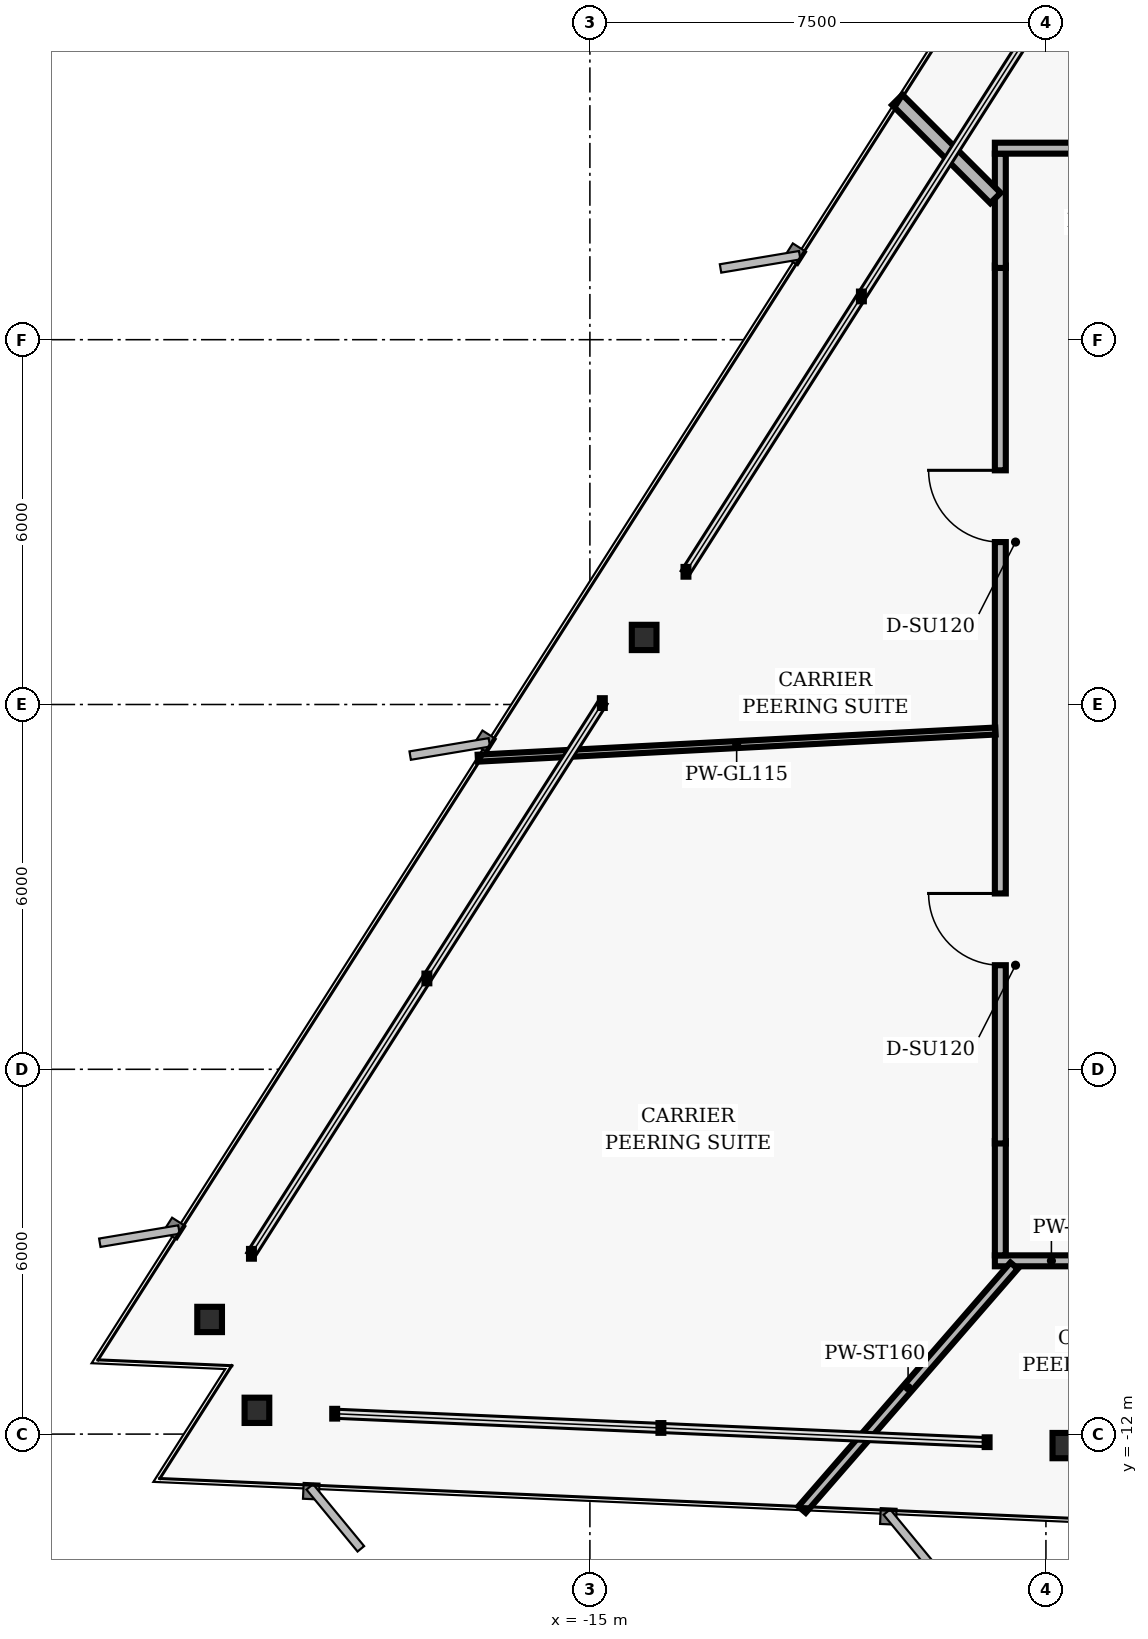
"""IFC4 building model, lengths in metres.
Left out: names, types, materials, properties, quantities, classifications, styles, units other than length and angle.
Written with IfcOpenShell. Run it as: python <this file> out.ifc"""

import sys

from ifc_helpers import new_model, si_unit, direction, frame, frame_2d, origin, origin_2d, place, context, subcontext, project, spatial, rectangle, i_section, extrude, element, fill, save


model = new_model("IFC4")
c1 = context("Model", 3, precision=1e-05, world=origin(), true_north=direction((0.0, 1.0)))
c2 = subcontext(c1, "Body", "Model", "MODEL_VIEW")
j1 = project(units=[si_unit("LENGTHUNIT", "METRE"), si_unit("PLANEANGLEUNIT", "RADIAN")], contexts=[c1])
p1 = place(None, origin())
s1 = spatial("IfcSite", under=j1, at=p1, CompositionType="ELEMENT")
p2 = place(p1, origin())
s2 = spatial("IfcBuilding", under=s1, at=p2, CompositionType="ELEMENT")
p3 = place(p2, frame((0.0, 0.0, 128.96)))
s3 = spatial("IfcBuildingStorey", under=s2, at=p3, CompositionType="ELEMENT", Elevation=128.96)
for number, where, z_axis, x_axis in (
    (1, (-14.108, 1.103, 0.0), (0.0, 0.0, 1.0), (1.0, 0.0, 0.0)),
    (2, (-21.254, -10.114, 0.0), (0.0, 0.0, 1.0), (1.0, 0.0, 0.0)),
    (3, (-20.476, -11.609, 0.0), (0.0, 0.0, 1.0), (1.0, 0.0, 0.0)),
    (4, (-7.188, -12.189, 0.0), (0.0, 0.0, 1.0), (1.0, 0.0, 0.0)),
):
    element("IfcColumn", number, at=place(p3, frame(where, z_axis=z_axis, x_axis=x_axis)), inside=s3, PredefinedType="COLUMN", context=c2, shape_type="SweptSolid", body=[
        extrude(i_section(OverallWidth=0.406, OverallDepth=0.416, WebThickness=0.03, FlangeThickness=0.048, FilletRadius=0.02, at=origin_2d()), origin(), (0.0, 0.0, 1.0), 3.04),
    ])
p4 = place(p3, frame((-6.48, -9.15, 0.0), z_axis=(0.0, 0.0, 1.0), x_axis=(-1.0, 0.0, 0.0)))
e5 = element("IfcWall", 5, at=p4, inside=s3, PredefinedType="PARTITIONING", context=c2, shape_type="SweptSolid", body=[
    extrude(rectangle(XDim=1.86, YDim=0.18, at=frame_2d((0.93, 0.0))), origin(), (0.0, 0.0, 1.0), 2.33),
])
p5 = place(p3, frame((-8.25, -9.06, 0.0), z_axis=(0.0, 0.0, 1.0), x_axis=(0.0, 1.0, 0.0)))
e6 = element("IfcWall", 6, at=p5, inside=s3, PredefinedType="PARTITIONING", context=c2, shape_type="SweptSolid", body=[
    extrude(rectangle(XDim=1.88, YDim=0.18, at=frame_2d((0.94, 0.0))), origin(), (0.0, 0.0, 1.0), 2.763),
])
p6 = place(p3, frame((-8.25, -7.22, 0.0), z_axis=(0.0, 0.0, 1.0), x_axis=(0.0, 1.0, 0.0)))
e7 = element("IfcWall", 7, at=p6, inside=s3, PredefinedType="PARTITIONING", context=c2, shape_type="SweptSolid", body=[
    extrude(rectangle(XDim=14.44, YDim=0.18, at=frame_2d((7.22, 0.0))), origin(), (0.0, 0.0, 1.0), 2.763),
])
p7 = place(p6, frame((2.932, 0.0, 0.0)))
e8 = element("IfcOpeningElement", 8, at=p7, cuts=e7, PredefinedType="OPENING", context=c2, shape_type="SweptSolid", body=[
    extrude(rectangle(XDim=1.18, YDim=2.02, at=frame_2d((0.59, 1.01))), frame((0.0, 0.1, 0.0), z_axis=(0.0, -1.0, 0.0), x_axis=(1.0, 0.0, 0.0)), (0.0, 0.0, 1.0), 0.2),
])
p8 = place(p6, frame((9.892, 0.0, 0.0)))
e9 = element("IfcOpeningElement", 9, at=p8, cuts=e7, PredefinedType="OPENING", context=c2, shape_type="SweptSolid", body=[
    extrude(rectangle(XDim=1.18, YDim=2.02, at=frame_2d((0.59, 1.01))), frame((0.0, 0.1, 0.0), z_axis=(0.0, -1.0, 0.0), x_axis=(1.0, 0.0, 0.0)), (0.0, 0.0, 1.0), 0.2),
])
p9 = place(p3, frame((-8.25, 7.18, 0.0), z_axis=(0.0, 0.0, 1.0), x_axis=(0.0, 1.0, 0.0)))
e10 = element("IfcWall", 10, at=p9, inside=s3, PredefinedType="PARTITIONING", context=c2, shape_type="SweptSolid", body=[
    extrude(rectangle(XDim=1.88, YDim=0.18, at=frame_2d((0.94, 0.0))), origin(), (0.0, 0.0, 1.0), 2.763),
])
p10 = place(p3, frame((-8.34, 9.15, 0.0), z_axis=(0.0, 0.0, 1.0), x_axis=(1.0, 0.0, 0.0)))
e11 = element("IfcWall", 11, at=p10, inside=s3, PredefinedType="PARTITIONING", context=c2, shape_type="SweptSolid", body=[
    extrude(rectangle(XDim=1.86, YDim=0.18, at=frame_2d((0.93, 0.0))), origin(), (0.0, 0.0, 1.0), 2.763),
])
p11 = place(p3, frame((-8.33, -0.437, 0.0), z_axis=(0.0, 0.0, 1.0), x_axis=(-0.998628646782, -0.052352897024, 0.0)))
e12 = element("IfcWall", 12, at=p11, inside=s3, PredefinedType="MOVABLE", context=c2, shape_type="SweptSolid", body=[
    extrude(rectangle(XDim=8.525, YDim=0.115, at=frame_2d((4.262, 0.0))), origin(), (0.0, 0.0, 1.0), 2.763),
])
p12 = place(p3, frame((-8.023, -9.23, 0.0), z_axis=(0.0, 0.0, 1.0), x_axis=(-0.656052478168, -0.754715274716, 0.0)))
e13 = element("IfcWall", 13, at=p12, inside=s3, PredefinedType="PARTITIONING", context=c2, shape_type="SweptSolid", body=[
    extrude(rectangle(XDim=5.315, YDim=0.16, at=frame_2d((2.658, 0.0))), origin(), (0.0, 0.0, 1.0), 2.763),
])
p13 = place(p3, frame((-8.33, 8.33, 0.0), z_axis=(0.0, 0.0, 1.0), x_axis=(-0.707106781187, 0.707106781187, 0.0)))
e14 = element("IfcWall", 14, at=p13, inside=s3, PredefinedType="PARTITIONING", context=c2, shape_type="SweptSolid", body=[
    extrude(rectangle(XDim=2.284, YDim=0.24, at=frame_2d((1.142, 0.0))), origin(), (0.0, 0.0, 1.0), 2.763),
])
p14 = place(p7, origin())
e15 = element("IfcDoor", 15, at=p14, inside=s3, OperationType="SINGLE_SWING_RIGHT", PredefinedType="DOOR", context=c2, shape_type="SweptSolid", body=[
    extrude(rectangle(XDim=1.18, YDim=2.02, at=frame_2d((0.59, 1.01))), frame((0.0, 0.025, 0.0), z_axis=(0.0, -1.0, 0.0), x_axis=(1.0, 0.0, 0.0)), (0.0, 0.0, 1.0), 0.05),
])
fill(e8, e15)
p15 = place(p8, origin())
e16 = element("IfcDoor", 16, at=p15, inside=s3, OperationType="SINGLE_SWING_RIGHT", PredefinedType="DOOR", context=c2, shape_type="SweptSolid", body=[
    extrude(rectangle(XDim=1.18, YDim=2.02, at=frame_2d((0.59, 1.01))), frame((0.0, 0.025, 0.0), z_axis=(0.0, -1.0, 0.0), x_axis=(1.0, 0.0, 0.0)), (0.0, 0.0, 1.0), 0.05),
])
fill(e9, e16)
save(model, sys.argv[1])
